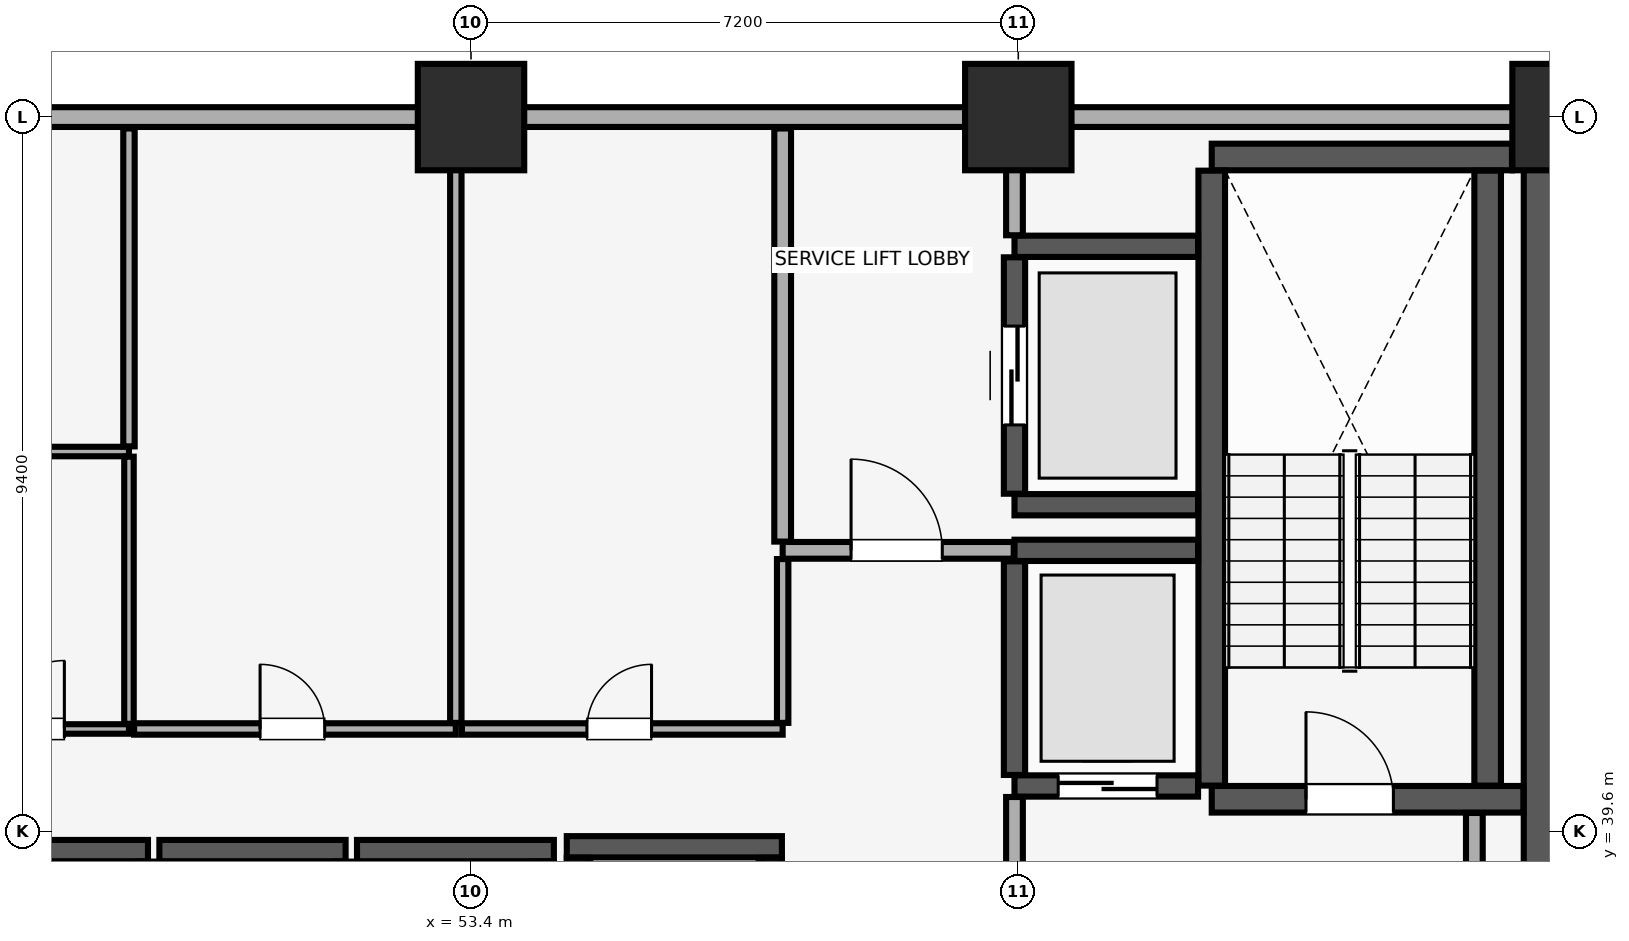
"""IFC4 building model, lengths in metres.
Left out: names, types, materials, properties, quantities, classifications, styles, units other than length and angle.
Written with IfcOpenShell. Run it as: python <this file> out.ifc"""

import sys

from ifc_helpers import new_model, si_unit, direction, frame, frame_2d, origin, origin_2d, place, context, subcontext, project, spatial, rectangle, extrude, element, fill, save


model = new_model("IFC4")
c1 = context("Model", 3, precision=1e-05, world=origin(), true_north=direction((0.0, 1.0)))
c2 = subcontext(c1, "Body", "Model", "MODEL_VIEW")
j1 = project(units=[si_unit("LENGTHUNIT", "METRE"), si_unit("PLANEANGLEUNIT", "RADIAN")], contexts=[c1])
p1 = place(None, origin())
s1 = spatial("IfcSite", under=j1, at=p1, CompositionType="ELEMENT")
p2 = place(p1, origin())
s2 = spatial("IfcBuilding", under=s1, at=p2, CompositionType="ELEMENT")
p3 = place(p2, frame((0.0, 0.0, 76.4)))
s3 = spatial("IfcBuildingStorey", under=s2, at=p3, CompositionType="ELEMENT", Elevation=76.4)
for number, where, z_axis, x_axis in (
    (1, (53.4, 49.0, 0.0), (0.0, 0.0, 1.0), (1.0, 0.0, 0.0)),
    (2, (60.6, 49.0, 0.0), (0.0, 0.0, 1.0), (1.0, 0.0, 0.0)),
    (3, (67.8, 49.0, 0.0), (0.0, 0.0, 1.0), (1.0, 0.0, 0.0)),
):
    element("IfcColumn", number, at=place(p3, frame(where, z_axis=z_axis, x_axis=x_axis)), inside=s3, PredefinedType="COLUMN", context=c2, shape_type="SweptSolid", body=[
        extrude(rectangle(XDim=1.4, YDim=1.4, at=origin_2d()), origin(), (0.0, 0.0, 1.0), 3.4),
    ])
p4 = place(p3, frame((79.8, 49.0, 0.0), z_axis=(0.0, 0.0, 1.0), x_axis=(-1.0, 0.0, 0.0)))
e4 = element("IfcWall", 4, at=p4, inside=s3, PredefinedType="SOLIDWALL", context=c2, shape_type="SweptSolid", body=[
    extrude(rectangle(XDim=75.6, YDim=0.26, at=frame_2d((37.8, 0.0))), origin(), (0.0, 0.0, 1.0), 2.45),
])
p5 = place(p3, frame((67.8, 29.4, 0.0), z_axis=(0.0, 0.0, 1.0), x_axis=(0.0, 1.0, 0.0)))
e5 = element("IfcWall", 5, at=p5, inside=s3, PredefinedType="SHEAR", context=c2, shape_type="SweptSolid", body=[
    extrude(rectangle(XDim=19.2, YDim=1.1, at=frame_2d((9.6, 0.0))), origin(), (0.0, 0.0, 1.0), 3.4),
])
p6 = place(p3, frame((63.145, 40.025, 0.0), z_axis=(0.0, 0.0, 1.0), x_axis=(1.0, 0.0, 0.0)))
e6 = element("IfcWall", 6, at=p6, inside=s3, PredefinedType="SHEAR", context=c2, shape_type="SweptSolid", body=[
    extrude(rectangle(XDim=4.1, YDim=0.35, at=frame_2d((2.05, 0.0))), origin(), (0.0, 0.0, 1.0), 3.4),
])
p7 = place(p6, frame((1.24, 0.0, 0.0)))
e7 = element("IfcOpeningElement", 7, at=p7, cuts=e6, PredefinedType="OPENING", context=c2, shape_type="SweptSolid", body=[
    extrude(rectangle(XDim=1.15, YDim=2.15, at=frame_2d((0.575, 1.075))), frame((0.0, 0.185, 0.0), z_axis=(0.0, -1.0, 0.0), x_axis=(1.0, 0.0, 0.0)), (0.0, 0.0, 1.0), 0.37),
])
p8 = place(p3, frame((63.145, 48.475, 0.0), z_axis=(0.0, 0.0, 1.0), x_axis=(1.0, 0.0, 0.0)))
e8 = element("IfcWall", 8, at=p8, inside=s3, PredefinedType="SHEAR", context=c2, shape_type="SweptSolid", body=[
    extrude(rectangle(XDim=3.95, YDim=0.35, at=frame_2d((1.975, 0.0))), origin(), (0.0, 0.0, 1.0), 3.4),
])
for number, where, z_axis, x_axis in (
    (9, (63.145, 40.205, 0.0), (0.0, 0.0, 1.0), (0.0, 1.0, 0.0)),
    (10, (66.775, 40.205, 0.0), (0.0, 0.0, 1.0), (0.0, 1.0, 0.0)),
):
    element("IfcWall", number, at=place(p3, frame(where, z_axis=z_axis, x_axis=x_axis)), inside=s3, PredefinedType="SHEAR", context=c2, shape_type="SweptSolid", body=[
        extrude(rectangle(XDim=8.09, YDim=0.35, at=frame_2d((4.045, 0.0))), origin(), (0.0, 0.0, 1.0), 3.4),
    ])
p9 = place(p3, frame((46.7, 39.35, 0.0), z_axis=(0.0, 0.0, 1.0), x_axis=(1.0, 0.0, 0.0)))
e11 = element("IfcWall", 11, at=p9, inside=s3, PredefinedType="SHEAR", context=c2, shape_type="SweptSolid", body=[
    extrude(rectangle(XDim=2.45, YDim=0.28, at=frame_2d((1.225, 0.0))), origin(), (0.0, 0.0, 1.0), 3.4),
])
p10 = place(p3, frame((49.15, 37.145, 0.0), z_axis=(0.0, 0.0, 1.0), x_axis=(0.0, 1.0, 0.0)))
e12 = element("IfcWall", 12, at=p10, inside=s3, PredefinedType="SHEAR", context=c2, shape_type="SweptSolid", body=[
    extrude(rectangle(XDim=2.06, YDim=0.28, at=frame_2d((1.03, 0.0))), origin(), (0.0, 0.0, 1.0), 3.4),
])
p11 = place(p3, frame((49.3, 39.35, 0.0), z_axis=(0.0, 0.0, 1.0), x_axis=(1.0, 0.0, 0.0)))
e13 = element("IfcWall", 13, at=p11, inside=s3, PredefinedType="SHEAR", context=c2, shape_type="SweptSolid", body=[
    extrude(rectangle(XDim=2.45, YDim=0.28, at=frame_2d((1.225, 0.0))), origin(), (0.0, 0.0, 1.0), 3.4),
])
p12 = place(p3, frame((51.75, 37.145, 0.0), z_axis=(0.0, 0.0, 1.0), x_axis=(0.0, 1.0, 0.0)))
e14 = element("IfcWall", 14, at=p12, inside=s3, PredefinedType="SHEAR", context=c2, shape_type="SweptSolid", body=[
    extrude(rectangle(XDim=2.06, YDim=0.28, at=frame_2d((1.03, 0.0))), origin(), (0.0, 0.0, 1.0), 3.4),
])
p13 = place(p3, frame((51.9, 39.35, 0.0), z_axis=(0.0, 0.0, 1.0), x_axis=(1.0, 0.0, 0.0)))
e15 = element("IfcWall", 15, at=p13, inside=s3, PredefinedType="SHEAR", context=c2, shape_type="SweptSolid", body=[
    extrude(rectangle(XDim=2.59, YDim=0.28, at=frame_2d((1.295, 0.0))), origin(), (0.0, 0.0, 1.0), 3.4),
])
p14 = place(p3, frame((54.35, 37.145, 0.0), z_axis=(0.0, 0.0, 1.0), x_axis=(0.0, 1.0, 0.0)))
e16 = element("IfcWall", 16, at=p14, inside=s3, PredefinedType="SHEAR", context=c2, shape_type="SweptSolid", body=[
    extrude(rectangle(XDim=2.06, YDim=0.28, at=frame_2d((1.03, 0.0))), origin(), (0.0, 0.0, 1.0), 3.4),
])
p15 = place(p3, frame((54.66, 39.4, 0.0), z_axis=(0.0, 0.0, 1.0), x_axis=(1.0, 0.0, 0.0)))
e17 = element("IfcWall", 17, at=p15, inside=s3, PredefinedType="SHEAR", context=c2, shape_type="SweptSolid", body=[
    extrude(rectangle(XDim=2.83, YDim=0.28, at=frame_2d((1.415, 0.0))), origin(), (0.0, 0.0, 1.0), 3.4),
])
for number, where, z_axis, x_axis in (
    (18, (54.8, 37.145, 0.0), (0.0, 0.0, 1.0), (0.0, 1.0, 0.0)),
    (19, (57.35, 37.145, 0.0), (0.0, 0.0, 1.0), (0.0, 1.0, 0.0)),
):
    element("IfcWall", number, at=place(p3, frame(where, z_axis=z_axis, x_axis=x_axis)), inside=s3, PredefinedType="SHEAR", context=c2, shape_type="SweptSolid", body=[
        extrude(rectangle(XDim=2.11, YDim=0.28, at=frame_2d((1.055, 0.0))), origin(), (0.0, 0.0, 1.0), 3.4),
    ])
p16 = place(p3, frame((60.55, 40.2, 0.0), z_axis=(0.0, 0.0, 1.0), x_axis=(1.0, 0.0, 0.0)))
e20 = element("IfcWall", 20, at=p16, inside=s3, PredefinedType="SHEAR", context=c2, shape_type="SweptSolid", body=[
    extrude(rectangle(XDim=2.415, YDim=0.28, at=frame_2d((1.208, 0.0))), origin(), (0.0, 0.0, 1.0), 3.4),
])
p17 = place(p16, frame((0.575, 0.0, 0.0)))
e21 = element("IfcOpeningElement", 21, at=p17, cuts=e20, PredefinedType="OPENING", context=c2, shape_type="SweptSolid", body=[
    extrude(rectangle(XDim=1.3, YDim=2.3, at=frame_2d((0.65, 1.15))), frame((0.0, 0.15, 0.0), z_axis=(0.0, -1.0, 0.0), x_axis=(1.0, 0.0, 0.0)), (0.0, 0.0, 1.0), 0.3),
])
p18 = place(p3, frame((60.55, 43.3, 0.0), z_axis=(0.0, 0.0, 1.0), x_axis=(1.0, 0.0, 0.0)))
e22 = element("IfcWall", 22, at=p18, inside=s3, PredefinedType="SHEAR", context=c2, shape_type="SweptSolid", body=[
    extrude(rectangle(XDim=2.415, YDim=0.28, at=frame_2d((1.208, 0.0))), origin(), (0.0, 0.0, 1.0), 3.4),
])
p19 = place(p3, frame((60.55, 40.345, 0.0), z_axis=(0.0, 0.0, 1.0), x_axis=(0.0, 1.0, 0.0)))
e23 = element("IfcWall", 23, at=p19, inside=s3, PredefinedType="SHEAR", context=c2, shape_type="SweptSolid", body=[
    extrude(rectangle(XDim=2.81, YDim=0.28, at=frame_2d((1.405, 0.0))), origin(), (0.0, 0.0, 1.0), 3.4),
])
for number, where, z_axis, x_axis in (
    (24, (60.55, 43.9, 0.0), (0.0, 0.0, 1.0), (1.0, 0.0, 0.0)),
    (25, (60.55, 47.3, 0.0), (0.0, 0.0, 1.0), (1.0, 0.0, 0.0)),
):
    element("IfcWall", number, at=place(p3, frame(where, z_axis=z_axis, x_axis=x_axis)), inside=s3, PredefinedType="SHEAR", context=c2, shape_type="SweptSolid", body=[
        extrude(rectangle(XDim=2.415, YDim=0.28, at=frame_2d((1.208, 0.0))), origin(), (0.0, 0.0, 1.0), 3.4),
    ])
p20 = place(p3, frame((60.55, 44.045, 0.0), z_axis=(0.0, 0.0, 1.0), x_axis=(0.0, 1.0, 0.0)))
e26 = element("IfcWall", 26, at=p20, inside=s3, PredefinedType="SHEAR", context=c2, shape_type="SweptSolid", body=[
    extrude(rectangle(XDim=3.11, YDim=0.28, at=frame_2d((1.555, 0.0))), origin(), (0.0, 0.0, 1.0), 3.4),
])
p21 = place(p20, frame((0.905, 0.0, 0.0)))
e27 = element("IfcOpeningElement", 27, at=p21, cuts=e26, PredefinedType="OPENING", context=c2, shape_type="SweptSolid", body=[
    extrude(rectangle(XDim=1.3, YDim=2.3, at=frame_2d((0.65, 1.15))), frame((0.0, 0.15, 0.0), z_axis=(0.0, -1.0, 0.0), x_axis=(1.0, 0.0, 0.0)), (0.0, 0.0, 1.0), 0.3),
])
p22 = place(p3, frame((60.55, 34.415, 0.0), z_axis=(0.0, 0.0, 1.0), x_axis=(0.0, 1.0, 0.0)))
e28 = element("IfcWall", 28, at=p22, inside=s3, PredefinedType="PARTITIONING", context=c2, shape_type="SweptSolid", body=[
    extrude(rectangle(XDim=5.64, YDim=0.22, at=frame_2d((2.82, 0.0))), origin(), (0.0, 0.0, 1.0), 3.4),
])
p23 = place(p3, frame((66.6, 34.415, 0.0), z_axis=(0.0, 0.0, 1.0), x_axis=(0.0, 1.0, 0.0)))
e29 = element("IfcWall", 29, at=p23, inside=s3, PredefinedType="PARTITIONING", context=c2, shape_type="SweptSolid", body=[
    extrude(rectangle(XDim=5.43, YDim=0.22, at=frame_2d((2.715, 0.0))), origin(), (0.0, 0.0, 1.0), 3.4),
])
p24 = place(p3, frame((57.5, 43.3, 0.0), z_axis=(0.0, 0.0, 1.0), x_axis=(1.0, 0.0, 0.0)))
e30 = element("IfcWall", 30, at=p24, inside=s3, PredefinedType="PARTITIONING", context=c2, shape_type="SweptSolid", body=[
    extrude(rectangle(XDim=3.04, YDim=0.22, at=frame_2d((1.52, 0.0))), origin(), (0.0, 0.0, 1.0), 3.4),
])
p25 = place(p24, frame((0.9, 0.0, 0.0)))
e31 = element("IfcOpeningElement", 31, at=p25, cuts=e30, PredefinedType="OPENING", context=c2, shape_type="SweptSolid", body=[
    extrude(rectangle(XDim=1.2, YDim=2.15, at=frame_2d((0.6, 1.075))), frame((0.0, 0.12, 0.0), z_axis=(0.0, -1.0, 0.0), x_axis=(1.0, 0.0, 0.0)), (0.0, 0.0, 1.0), 0.24),
])
p26 = place(p3, frame((57.5, 43.415, 0.0), z_axis=(0.0, 0.0, 1.0), x_axis=(0.0, 1.0, 0.0)))
e32 = element("IfcWall", 32, at=p26, inside=s3, PredefinedType="PARTITIONING", context=c2, shape_type="SweptSolid", body=[
    extrude(rectangle(XDim=5.435, YDim=0.22, at=frame_2d((2.718, 0.0))), origin(), (0.0, 0.0, 1.0), 3.4),
])
p27 = place(p3, frame((60.55, 47.445, 0.0), z_axis=(0.0, 0.0, 1.0), x_axis=(0.0, 1.0, 0.0)))
e33 = element("IfcWall", 33, at=p27, inside=s3, PredefinedType="PARTITIONING", context=c2, shape_type="SweptSolid", body=[
    extrude(rectangle(XDim=1.405, YDim=0.22, at=frame_2d((0.703, 0.0))), origin(), (0.0, 0.0, 1.0), 3.4),
])
p28 = place(p3, frame((44.3, 40.95, 0.0), z_axis=(0.0, 0.0, 1.0), x_axis=(1.0, 0.0, 0.0)))
e34 = element("IfcWall", 34, at=p28, inside=s3, PredefinedType="PARTITIONING", context=c2, shape_type="SweptSolid", body=[
    extrude(rectangle(XDim=4.6, YDim=0.125, at=frame_2d((2.3, 0.0))), origin(), (0.0, 0.0, 1.0), 3.4),
])
p29 = place(p28, frame((2.85, 0.0, 0.0)))
e35 = element("IfcOpeningElement", 35, at=p29, cuts=e34, PredefinedType="OPENING", context=c2, shape_type="SweptSolid", body=[
    extrude(rectangle(XDim=0.9, YDim=2.1, at=frame_2d((0.45, 1.05))), frame((0.0, 0.073, 0.0), z_axis=(0.0, -1.0, 0.0), x_axis=(1.0, 0.0, 0.0)), (0.0, 0.0, 1.0), 0.145),
])
p30 = place(p3, frame((44.3, 44.6, 0.0), z_axis=(0.0, 0.0, 1.0), x_axis=(1.0, 0.0, 0.0)))
e36 = element("IfcWall", 36, at=p30, inside=s3, PredefinedType="PARTITIONING", context=c2, shape_type="SweptSolid", body=[
    extrude(rectangle(XDim=4.6, YDim=0.125, at=frame_2d((2.3, 0.0))), origin(), (0.0, 0.0, 1.0), 3.4),
])
p31 = place(p3, frame((48.9, 41.018, 0.0), z_axis=(0.0, 0.0, 1.0), x_axis=(0.0, 1.0, 0.0)))
e37 = element("IfcWall", 37, at=p31, inside=s3, PredefinedType="PARTITIONING", context=c2, shape_type="SweptSolid", body=[
    extrude(rectangle(XDim=3.515, YDim=0.125, at=frame_2d((1.757, 0.0))), origin(), (0.0, 0.0, 1.0), 3.4),
])
p32 = place(p3, frame((48.968, 40.95, 0.0), z_axis=(0.0, 0.0, 1.0), x_axis=(1.0, 0.0, 0.0)))
e38 = element("IfcWall", 38, at=p32, inside=s3, PredefinedType="PARTITIONING", context=c2, shape_type="SweptSolid", body=[
    extrude(rectangle(XDim=4.232, YDim=0.15, at=frame_2d((2.116, 0.0))), origin(), (0.0, 0.0, 1.0), 3.4),
])
p33 = place(p32, frame((1.657, 0.0, 0.0)))
e39 = element("IfcOpeningElement", 39, at=p33, cuts=e38, PredefinedType="OPENING", context=c2, shape_type="SweptSolid", body=[
    extrude(rectangle(XDim=0.85, YDim=2.1, at=frame_2d((0.425, 1.05))), frame((0.0, 0.085, 0.0), z_axis=(0.0, -1.0, 0.0), x_axis=(1.0, 0.0, 0.0)), (0.0, 0.0, 1.0), 0.17),
])
p34 = place(p3, frame((48.9, 44.667, 0.0), z_axis=(0.0, 0.0, 1.0), x_axis=(0.0, 1.0, 0.0)))
e40 = element("IfcWall", 40, at=p34, inside=s3, PredefinedType="PARTITIONING", context=c2, shape_type="SweptSolid", body=[
    extrude(rectangle(XDim=4.183, YDim=0.15, at=frame_2d((2.091, 0.0))), origin(), (0.0, 0.0, 1.0), 3.4),
])
p35 = place(p3, frame((53.2, 41.03, 0.0), z_axis=(0.0, 0.0, 1.0), x_axis=(0.0, 1.0, 0.0)))
e41 = element("IfcWall", 41, at=p35, inside=s3, PredefinedType="PARTITIONING", context=c2, shape_type="SweptSolid", body=[
    extrude(rectangle(XDim=7.82, YDim=0.15, at=frame_2d((3.91, 0.0))), origin(), (0.0, 0.0, 1.0), 3.4),
])
p36 = place(p3, frame((53.28, 40.95, 0.0), z_axis=(0.0, 0.0, 1.0), x_axis=(1.0, 0.0, 0.0)))
e42 = element("IfcWall", 42, at=p36, inside=s3, PredefinedType="PARTITIONING", context=c2, shape_type="SweptSolid", body=[
    extrude(rectangle(XDim=4.22, YDim=0.15, at=frame_2d((2.11, 0.0))), origin(), (0.0, 0.0, 1.0), 3.4),
])
p37 = place(p36, frame((1.645, 0.0, 0.0)))
e43 = element("IfcOpeningElement", 43, at=p37, cuts=e42, PredefinedType="OPENING", context=c2, shape_type="SweptSolid", body=[
    extrude(rectangle(XDim=0.85, YDim=2.1, at=frame_2d((0.425, 1.05))), frame((0.0, 0.085, 0.0), z_axis=(0.0, -1.0, 0.0), x_axis=(1.0, 0.0, 0.0)), (0.0, 0.0, 1.0), 0.17),
])
p38 = place(p3, frame((57.5, 41.03, 0.0), z_axis=(0.0, 0.0, 1.0), x_axis=(0.0, 1.0, 0.0)))
e44 = element("IfcWall", 44, at=p38, inside=s3, PredefinedType="PARTITIONING", context=c2, shape_type="SweptSolid", body=[
    extrude(rectangle(XDim=2.155, YDim=0.15, at=frame_2d((1.078, 0.0))), origin(), (0.0, 0.0, 1.0), 3.4),
])
p39 = place(p7, origin())
e45 = element("IfcDoor", 45, at=p39, inside=s3, OperationType="SINGLE_SWING_LEFT", PredefinedType="DOOR", context=c2, shape_type="SweptSolid", body=[
    extrude(rectangle(XDim=1.15, YDim=2.15, at=frame_2d((0.575, 1.075))), frame((0.0, 0.025, 0.0), z_axis=(0.0, -1.0, 0.0), x_axis=(1.0, 0.0, 0.0)), (0.0, 0.0, 1.0), 0.05),
])
fill(e7, e45)
p40 = place(p17, origin())
e46 = element("IfcDoor", 46, at=p40, inside=s3, OperationType="DOUBLE_DOOR_SLIDING", PredefinedType="DOOR", context=c2, shape_type="SweptSolid", body=[
    extrude(rectangle(XDim=1.3, YDim=2.3, at=frame_2d((0.65, 1.15))), frame((0.0, 0.025, 0.0), z_axis=(0.0, -1.0, 0.0), x_axis=(1.0, 0.0, 0.0)), (0.0, 0.0, 1.0), 0.05),
])
fill(e21, e46)
p41 = place(p21, origin())
e47 = element("IfcDoor", 47, at=p41, inside=s3, OperationType="DOUBLE_DOOR_SLIDING", PredefinedType="DOOR", context=c2, shape_type="SweptSolid", body=[
    extrude(rectangle(XDim=1.3, YDim=2.3, at=frame_2d((0.65, 1.15))), frame((0.0, 0.025, 0.0), z_axis=(0.0, -1.0, 0.0), x_axis=(1.0, 0.0, 0.0)), (0.0, 0.0, 1.0), 0.05),
])
fill(e27, e47)
p42 = place(p25, origin())
e48 = element("IfcDoor", 48, at=p42, inside=s3, OperationType="SINGLE_SWING_LEFT", PredefinedType="DOOR", context=c2, shape_type="SweptSolid", body=[
    extrude(rectangle(XDim=1.2, YDim=2.15, at=frame_2d((0.6, 1.075))), frame((0.0, 0.025, 0.0), z_axis=(0.0, -1.0, 0.0), x_axis=(1.0, 0.0, 0.0)), (0.0, 0.0, 1.0), 0.05),
])
fill(e31, e48)
p43 = place(p29, origin())
e49 = element("IfcDoor", 49, at=p43, inside=s3, OperationType="SINGLE_SWING_RIGHT", PredefinedType="DOOR", context=c2, shape_type="SweptSolid", body=[
    extrude(rectangle(XDim=0.9, YDim=2.1, at=frame_2d((0.45, 1.05))), frame((0.0, 0.025, 0.0), z_axis=(0.0, -1.0, 0.0), x_axis=(1.0, 0.0, 0.0)), (0.0, 0.0, 1.0), 0.05),
])
fill(e35, e49)
p44 = place(p33, origin())
e50 = element("IfcDoor", 50, at=p44, inside=s3, OperationType="SINGLE_SWING_LEFT", PredefinedType="DOOR", context=c2, shape_type="SweptSolid", body=[
    extrude(rectangle(XDim=0.85, YDim=2.1, at=frame_2d((0.425, 1.05))), frame((0.0, 0.025, 0.0), z_axis=(0.0, -1.0, 0.0), x_axis=(1.0, 0.0, 0.0)), (0.0, 0.0, 1.0), 0.05),
])
fill(e39, e50)
p45 = place(p37, origin())
e51 = element("IfcDoor", 51, at=p45, inside=s3, OperationType="SINGLE_SWING_RIGHT", PredefinedType="DOOR", context=c2, shape_type="SweptSolid", body=[
    extrude(rectangle(XDim=0.85, YDim=2.1, at=frame_2d((0.425, 1.05))), frame((0.0, 0.025, 0.0), z_axis=(0.0, -1.0, 0.0), x_axis=(1.0, 0.0, 0.0)), (0.0, 0.0, 1.0), 0.05),
])
fill(e43, e51)
save(model, sys.argv[1])
